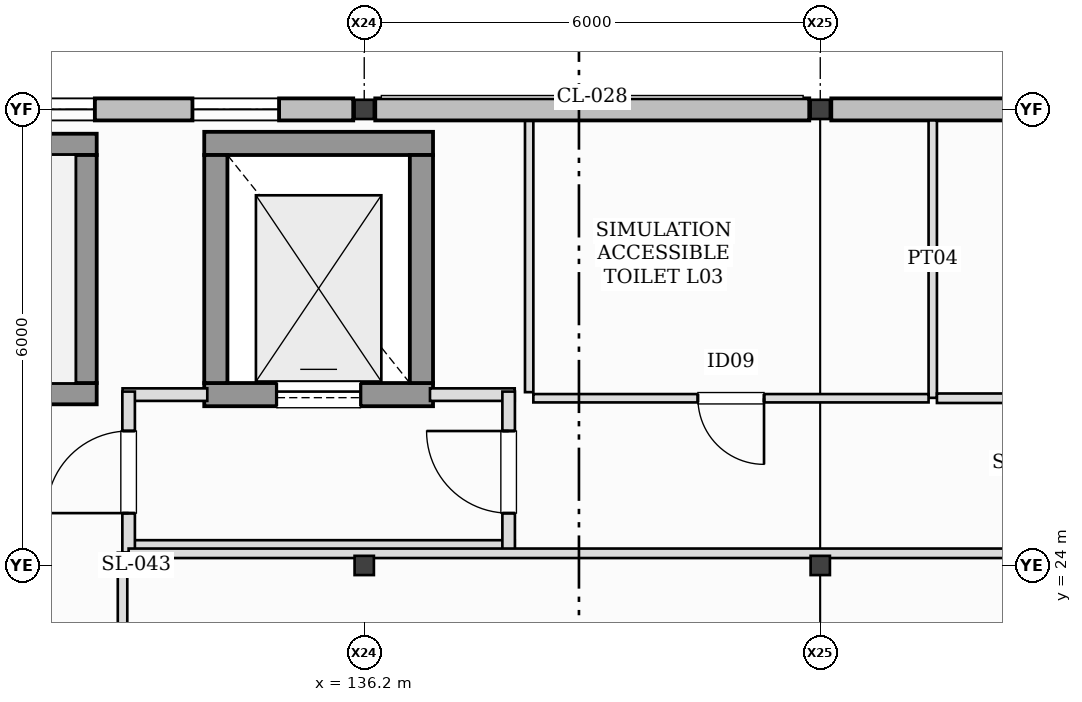
"""IFC4 building model, lengths in metres.
Left out: names, types, materials, properties, quantities, classifications, styles, units other than length and angle.
Written with IfcOpenShell. Run it as: python <this file> out.ifc"""

import sys

from ifc_helpers import new_model, si_unit, direction, frame, frame_2d, origin, origin_2d, place, context, subcontext, project, spatial, rectangle, i_section, extrude, element, fill, save


model = new_model("IFC4")
c1 = context("Model", 3, precision=1e-05, world=origin(), true_north=direction((0.0, 1.0)))
c2 = subcontext(c1, "Body", "Model", "MODEL_VIEW")
j1 = project(units=[si_unit("LENGTHUNIT", "METRE"), si_unit("PLANEANGLEUNIT", "RADIAN")], contexts=[c1])
p1 = place(None, origin())
s1 = spatial("IfcSite", under=j1, at=p1, CompositionType="ELEMENT")
p2 = place(p1, origin())
s2 = spatial("IfcBuilding", under=s1, at=p2, CompositionType="ELEMENT")
p3 = place(p2, frame((0.0, 0.0, 10.0)))
s3 = spatial("IfcBuildingStorey", under=s2, at=p3, CompositionType="ELEMENT", Elevation=10.0)
for number, where, z_axis, x_axis in (
    (1, (136.2, 24.0, 0.0), (0.0, 0.0, 1.0), (1.0, 0.0, 0.0)),
    (2, (136.2, 30.0, 0.0), (0.0, 0.0, 1.0), (1.0, 0.0, 0.0)),
    (3, (142.2, 24.0, 0.0), (0.0, 0.0, 1.0), (1.0, 0.0, 0.0)),
    (4, (142.2, 30.0, 0.0), (0.0, 0.0, 1.0), (1.0, 0.0, 0.0)),
):
    element("IfcColumn", number, at=place(p3, frame(where, z_axis=z_axis, x_axis=x_axis)), inside=s3, PredefinedType="COLUMN", context=c2, shape_type="SweptSolid", body=[
        extrude(i_section(OverallWidth=0.254, OverallDepth=0.253, WebThickness=0.009, FlangeThickness=0.014, at=origin_2d()), origin(), (0.0, 0.0, 1.0), 4.0),
    ])
p4 = place(p3, frame((136.055, 30.0, 0.0), z_axis=(0.0, 0.0, 1.0), x_axis=(-1.0, 0.0, 0.0)))
e5 = element("IfcWall", 5, at=p4, inside=s3, PredefinedType="STANDARD", context=c2, shape_type="SweptSolid", body=[
    extrude(rectangle(XDim=5.71, YDim=0.29, at=frame_2d((2.855, 0.0))), origin(), (0.0, 0.0, 1.0), 4.0),
])
p5 = place(p4, frame((0.975, 0.0, 1.42)))
e6 = element("IfcOpeningElement", 6, at=p5, cuts=e5, PredefinedType="OPENING", context=c2, shape_type="SweptSolid", body=[
    extrude(rectangle(XDim=1.14, YDim=1.14, at=frame_2d((0.57, 0.57))), frame((0.0, 0.155, 0.0), z_axis=(0.0, -1.0, 0.0), x_axis=(1.0, 0.0, 0.0)), (0.0, 0.0, 1.0), 0.31),
])
p6 = place(p4, frame((3.399, 0.0, 1.28)))
e7 = element("IfcOpeningElement", 7, at=p6, cuts=e5, PredefinedType="OPENING", context=c2, shape_type="SweptSolid", body=[
    extrude(rectangle(XDim=1.38, YDim=1.38, at=frame_2d((0.69, 0.69))), frame((0.0, 0.155, 0.0), z_axis=(0.0, -1.0, 0.0), x_axis=(1.0, 0.0, 0.0)), (0.0, 0.0, 1.0), 0.31),
])
p7 = place(p3, frame((142.055, 30.0, 0.0), z_axis=(0.0, 0.0, 1.0), x_axis=(-1.0, 0.0, 0.0)))
e8 = element("IfcWall", 8, at=p7, inside=s3, PredefinedType="STANDARD", context=c2, shape_type="SweptSolid", body=[
    extrude(rectangle(XDim=5.71, YDim=0.29, at=frame_2d((2.855, 0.0))), origin(), (0.0, 0.0, 1.0), 4.0),
])
p8 = place(p3, frame((148.055, 30.0, 0.0), z_axis=(0.0, 0.0, 1.0), x_axis=(-1.0, 0.0, 0.0)))
e9 = element("IfcWall", 9, at=p8, inside=s3, PredefinedType="STANDARD", context=c2, shape_type="SweptSolid", body=[
    extrude(rectangle(XDim=5.71, YDim=0.29, at=frame_2d((2.855, 0.0))), origin(), (0.0, 0.0, 1.0), 4.0),
])
p9 = place(p8, frame((0.897, 0.0, 1.28)))
e10 = element("IfcOpeningElement", 10, at=p9, cuts=e9, PredefinedType="OPENING", context=c2, shape_type="SweptSolid", body=[
    extrude(rectangle(XDim=1.26, YDim=1.26, at=frame_2d((0.63, 0.63))), frame((0.0, 0.155, 0.0), z_axis=(0.0, -1.0, 0.0), x_axis=(1.0, 0.0, 0.0)), (0.0, 0.0, 1.0), 0.31),
])
p10 = place(p3, frame((124.52, 26.26, 0.0), z_axis=(0.0, 0.0, 1.0), x_axis=(1.0, 0.0, 0.0)))
e11 = element("IfcWall", 11, at=p10, inside=s3, PredefinedType="SHEAR", context=c2, shape_type="SweptSolid", body=[
    extrude(rectangle(XDim=8.16, YDim=0.28, at=frame_2d((4.08, 0.0))), origin(), (0.0, 0.0, 1.0), 3.75),
])
p11 = place(p10, frame((0.65, 0.0, 0.0)))
e12 = element("IfcOpeningElement", 12, at=p11, cuts=e11, PredefinedType="OPENING", context=c2, shape_type="SweptSolid", body=[
    extrude(rectangle(XDim=0.98, YDim=2.15, at=frame_2d((0.49, 1.075))), frame((0.0, 0.15, 0.0), z_axis=(0.0, -1.0, 0.0), x_axis=(1.0, 0.0, 0.0)), (0.0, 0.0, 1.0), 0.3),
])
p12 = place(p3, frame((132.68, 29.54, 0.0), z_axis=(0.0, 0.0, 1.0), x_axis=(-1.0, 0.0, 0.0)))
e13 = element("IfcWall", 13, at=p12, inside=s3, PredefinedType="SHEAR", context=c2, shape_type="SweptSolid", body=[
    extrude(rectangle(XDim=8.16, YDim=0.28, at=frame_2d((4.08, 0.0))), origin(), (0.0, 0.0, 1.0), 3.75),
])
p13 = place(p3, frame((132.54, 26.4, 0.0), z_axis=(0.0, 0.0, 1.0), x_axis=(0.0, 1.0, 0.0)))
e14 = element("IfcWall", 14, at=p13, inside=s3, PredefinedType="SHEAR", context=c2, shape_type="SweptSolid", body=[
    extrude(rectangle(XDim=3.0, YDim=0.28, at=frame_2d((1.5, 0.0))), origin(), (0.0, 0.0, 1.0), 3.75),
])
p14 = place(p3, frame((134.095, 26.248, 0.0), z_axis=(0.0, 0.0, 1.0), x_axis=(1.0, 0.0, 0.0)))
e15 = element("IfcWall", 15, at=p14, inside=s3, PredefinedType="SHEAR", context=c2, shape_type="SweptSolid", body=[
    extrude(rectangle(XDim=3.01, YDim=0.305, at=frame_2d((1.505, 0.0))), origin(), (0.0, 0.0, 1.0), 3.75),
])
p15 = place(p14, frame((0.955, 0.0, 0.0)))
e16 = element("IfcOpeningElement", 16, at=p15, cuts=e15, PredefinedType="OPENING", context=c2, shape_type="SweptSolid", body=[
    extrude(rectangle(XDim=1.1, YDim=2.15, at=frame_2d((0.55, 1.075))), frame((0.0, 0.162, 0.0), z_axis=(0.0, -1.0, 0.0), x_axis=(1.0, 0.0, 0.0)), (0.0, 0.0, 1.0), 0.325),
])
p16 = place(p3, frame((137.105, 29.552, 0.0), z_axis=(0.0, 0.0, 1.0), x_axis=(-1.0, 0.0, 0.0)))
e17 = element("IfcWall", 17, at=p16, inside=s3, PredefinedType="SHEAR", context=c2, shape_type="SweptSolid", body=[
    extrude(rectangle(XDim=3.01, YDim=0.305, at=frame_2d((1.505, 0.0))), origin(), (0.0, 0.0, 1.0), 3.75),
])
for number, where, z_axis, x_axis in (
    (18, (134.248, 29.4, 0.0), (0.0, 0.0, 1.0), (0.0, -1.0, 0.0)),
    (19, (136.952, 26.4, 0.0), (0.0, 0.0, 1.0), (0.0, 1.0, 0.0)),
):
    element("IfcWall", number, at=place(p3, frame(where, z_axis=z_axis, x_axis=x_axis)), inside=s3, PredefinedType="SHEAR", context=c2, shape_type="SweptSolid", body=[
        extrude(rectangle(XDim=3.0, YDim=0.305, at=frame_2d((1.5, 0.0))), origin(), (0.0, 0.0, 1.0), 3.75),
    ])
p17 = place(p3, frame((133.02, 24.25, 0.0), z_axis=(0.0, 0.0, 1.0), x_axis=(1.0, 0.0, 0.0)))
e20 = element("IfcWall", 20, at=p17, inside=s3, PredefinedType="PARTITIONING", context=c2, shape_type="SweptSolid", body=[
    extrude(rectangle(XDim=5.16, YDim=0.165, at=frame_2d((2.58, 0.0))), origin(), (0.0, 0.0, 1.0), 3.74),
])
for number, where, z_axis, x_axis in (
    (21, (133.02, 26.248, 0.0), (0.0, 0.0, 1.0), (1.0, 0.0, 0.0)),
    (22, (137.065, 26.248, 0.0), (0.0, 0.0, 1.0), (1.0, 0.0, 0.0)),
):
    element("IfcWall", number, at=place(p3, frame(where, z_axis=z_axis, x_axis=x_axis)), inside=s3, PredefinedType="PARTITIONING", context=c2, shape_type="SweptSolid", body=[
        extrude(rectangle(XDim=1.115, YDim=0.165, at=frame_2d((0.558, 0.0))), origin(), (0.0, 0.0, 1.0), 3.74),
    ])
p18 = place(p3, frame((133.1, 24.17, 0.0), z_axis=(0.0, 0.0, 1.0), x_axis=(0.0, 1.0, 0.0)))
e23 = element("IfcWall", 23, at=p18, inside=s3, PredefinedType="PARTITIONING", context=c2, shape_type="SweptSolid", body=[
    extrude(rectangle(XDim=2.118, YDim=0.165, at=frame_2d((1.059, 0.0))), origin(), (0.0, 0.0, 1.0), 3.74),
])
p19 = place(p18, frame((0.519, 0.0, 0.0)))
e24 = element("IfcOpeningElement", 24, at=p19, cuts=e23, PredefinedType="OPENING", context=c2, shape_type="SweptSolid", body=[
    extrude(rectangle(XDim=1.08, YDim=2.14, at=frame_2d((0.54, 1.07))), frame((0.0, 0.093, 0.0), z_axis=(0.0, -1.0, 0.0), x_axis=(1.0, 0.0, 0.0)), (0.0, 0.0, 1.0), 0.185),
])
p20 = place(p3, frame((138.1, 24.17, 0.0), z_axis=(0.0, 0.0, 1.0), x_axis=(0.0, 1.0, 0.0)))
e25 = element("IfcWall", 25, at=p20, inside=s3, PredefinedType="PARTITIONING", context=c2, shape_type="SweptSolid", body=[
    extrude(rectangle(XDim=2.118, YDim=0.165, at=frame_2d((1.059, 0.0))), origin(), (0.0, 0.0, 1.0), 3.74),
])
p21 = place(p20, frame((0.519, 0.0, 0.0)))
e26 = element("IfcOpeningElement", 26, at=p21, cuts=e25, PredefinedType="OPENING", context=c2, shape_type="SweptSolid", body=[
    extrude(rectangle(XDim=1.08, YDim=2.14, at=frame_2d((0.54, 1.07))), frame((0.0, 0.093, 0.0), z_axis=(0.0, -1.0, 0.0), x_axis=(1.0, 0.0, 0.0)), (0.0, 0.0, 1.0), 0.185),
])
p22 = place(p3, frame((133.02, 18.145, 0.0), z_axis=(0.0, 0.0, 1.0), x_axis=(0.0, 1.0, 0.0)))
e27 = element("IfcWall", 27, at=p22, inside=s3, PredefinedType="PARTITIONING", context=c2, shape_type="SweptSolid", body=[
    extrude(rectangle(XDim=6.022, YDim=0.125, at=frame_2d((3.011, 0.0))), origin(), (0.0, 0.0, 1.0), 3.74),
])
p23 = place(p22, frame((2.447, 0.0, 0.0)))
e28 = element("IfcOpeningElement", 28, at=p23, cuts=e27, PredefinedType="OPENING", context=c2, shape_type="SweptSolid", body=[
    extrude(rectangle(XDim=0.9, YDim=2.1, at=frame_2d((0.45, 1.05))), frame((0.0, 0.073, 0.0), z_axis=(0.0, -1.0, 0.0), x_axis=(1.0, 0.0, 0.0)), (0.0, 0.0, 1.0), 0.145),
])
p24 = place(p3, frame((133.1, 24.16, 0.0), z_axis=(0.0, 0.0, 1.0), x_axis=(1.0, 0.0, 0.0)))
e29 = element("IfcWall", 29, at=p24, inside=s3, PredefinedType="PARTITIONING", context=c2, shape_type="SweptSolid", body=[
    extrude(rectangle(XDim=16.782, YDim=0.125, at=frame_2d((8.391, 0.0))), origin(), (0.0, 0.0, 1.0), 3.74),
])
p25 = place(p3, frame((138.37, 26.28, 0.0), z_axis=(0.0, 0.0, 1.0), x_axis=(0.0, 1.0, 0.0)))
e30 = element("IfcWall", 30, at=p25, inside=s3, PredefinedType="PARTITIONING", context=c2, shape_type="SweptSolid", body=[
    extrude(rectangle(XDim=3.575, YDim=0.11, at=frame_2d((1.788, 0.0))), origin(), (0.0, 0.0, 1.0), 3.74),
])
p26 = place(p3, frame((143.68, 29.855, 0.0), z_axis=(0.0, 0.0, 1.0), x_axis=(0.0, -1.0, 0.0)))
e31 = element("IfcWall", 31, at=p26, inside=s3, PredefinedType="PARTITIONING", context=c2, shape_type="SweptSolid", body=[
    extrude(rectangle(XDim=3.65, YDim=0.11, at=frame_2d((1.825, 0.0))), origin(), (0.0, 0.0, 1.0), 3.74),
])
p27 = place(p3, frame((143.625, 26.2, 0.0), z_axis=(0.0, 0.0, 1.0), x_axis=(-1.0, 0.0, 0.0)))
e32 = element("IfcWall", 32, at=p27, inside=s3, PredefinedType="PARTITIONING", context=c2, shape_type="SweptSolid", body=[
    extrude(rectangle(XDim=5.2, YDim=0.11, at=frame_2d((2.6, 0.0))), origin(), (0.0, 0.0, 1.0), 3.74),
])
p28 = place(p27, frame((2.165, 0.0, 0.0)))
e33 = element("IfcOpeningElement", 33, at=p28, cuts=e32, PredefinedType="OPENING", context=c2, shape_type="SweptSolid", body=[
    extrude(rectangle(XDim=0.87, YDim=2.06, at=frame_2d((0.435, 1.03))), frame((0.0, 0.065, 0.0), z_axis=(0.0, -1.0, 0.0), x_axis=(1.0, 0.0, 0.0)), (0.0, 0.0, 1.0), 0.13),
])
p29 = place(p3, frame((157.72, 26.2, 0.0), z_axis=(0.0, 0.0, 1.0), x_axis=(-1.0, 0.0, 0.0)))
e34 = element("IfcWall", 34, at=p29, inside=s3, PredefinedType="PARTITIONING", context=c2, shape_type="SweptSolid", body=[
    extrude(rectangle(XDim=13.985, YDim=0.125, at=frame_2d((6.992, 0.0))), origin(), (0.0, 0.0, 1.0), 3.74),
])
p30 = place(p29, frame((6.353, 0.0, 0.0)))
e35 = element("IfcOpeningElement", 35, at=p30, cuts=e34, PredefinedType="OPENING", context=c2, shape_type="SweptSolid", body=[
    extrude(rectangle(XDim=1.5, YDim=2.22, at=frame_2d((0.75, 1.11))), frame((0.0, 0.073, 0.0), z_axis=(0.0, -1.0, 0.0), x_axis=(1.0, 0.0, 0.0)), (0.0, 0.0, 1.0), 0.145),
])
p31 = place(p5, origin())
e36 = element("IfcWindow", 36, at=p31, inside=s3, PartitioningType="SINGLE_PANEL", PredefinedType="WINDOW", context=c2, shape_type="SweptSolid", body=[
    extrude(rectangle(XDim=1.14, YDim=1.14, at=frame_2d((0.57, 0.57))), frame((0.0, 0.03, 0.0), z_axis=(0.0, -1.0, 0.0), x_axis=(1.0, 0.0, 0.0)), (0.0, 0.0, 1.0), 0.06),
])
fill(e6, e36)
p32 = place(p6, origin())
e37 = element("IfcWindow", 37, at=p32, inside=s3, PartitioningType="SINGLE_PANEL", PredefinedType="WINDOW", context=c2, shape_type="SweptSolid", body=[
    extrude(rectangle(XDim=1.38, YDim=1.38, at=frame_2d((0.69, 0.69))), frame((0.0, 0.03, 0.0), z_axis=(0.0, -1.0, 0.0), x_axis=(1.0, 0.0, 0.0)), (0.0, 0.0, 1.0), 0.06),
])
fill(e7, e37)
p33 = place(p15, origin())
e38 = element("IfcDoor", 38, at=p33, inside=s3, OperationType="SLIDING_TO_LEFT", PredefinedType="DOOR", context=c2, shape_type="SweptSolid", body=[
    extrude(rectangle(XDim=1.1, YDim=2.15, at=frame_2d((0.55, 1.075))), frame((0.0, 0.025, 0.0), z_axis=(0.0, -1.0, 0.0), x_axis=(1.0, 0.0, 0.0)), (0.0, 0.0, 1.0), 0.05),
])
fill(e16, e38)
p34 = place(p19, frame((1.08, 0.0, 0.0), z_axis=(0.0, 0.0, 1.0), x_axis=(-1.0, 0.0, 0.0)))
e39 = element("IfcDoor", 39, at=p34, inside=s3, OperationType="SINGLE_SWING_LEFT", PredefinedType="DOOR", context=c2, shape_type="SweptSolid", body=[
    extrude(rectangle(XDim=1.08, YDim=2.14, at=frame_2d((0.54, 1.07))), frame((0.0, 0.025, 0.0), z_axis=(0.0, -1.0, 0.0), x_axis=(1.0, 0.0, 0.0)), (0.0, 0.0, 1.0), 0.05),
])
fill(e24, e39)
p35 = place(p21, origin())
e40 = element("IfcDoor", 40, at=p35, inside=s3, OperationType="SINGLE_SWING_RIGHT", PredefinedType="DOOR", context=c2, shape_type="SweptSolid", body=[
    extrude(rectangle(XDim=1.08, YDim=2.14, at=frame_2d((0.54, 1.07))), frame((0.0, 0.025, 0.0), z_axis=(0.0, -1.0, 0.0), x_axis=(1.0, 0.0, 0.0)), (0.0, 0.0, 1.0), 0.05),
])
fill(e26, e40)
p36 = place(p28, frame((0.87, 0.0, 0.0), z_axis=(0.0, 0.0, 1.0), x_axis=(-1.0, 0.0, 0.0)))
e41 = element("IfcDoor", 41, at=p36, inside=s3, OperationType="SINGLE_SWING_LEFT", PredefinedType="DOOR", context=c2, shape_type="SweptSolid", body=[
    extrude(rectangle(XDim=0.87, YDim=2.06, at=frame_2d((0.435, 1.03))), frame((0.0, 0.025, 0.0), z_axis=(0.0, -1.0, 0.0), x_axis=(1.0, 0.0, 0.0)), (0.0, 0.0, 1.0), 0.05),
])
fill(e33, e41)
save(model, sys.argv[1])
